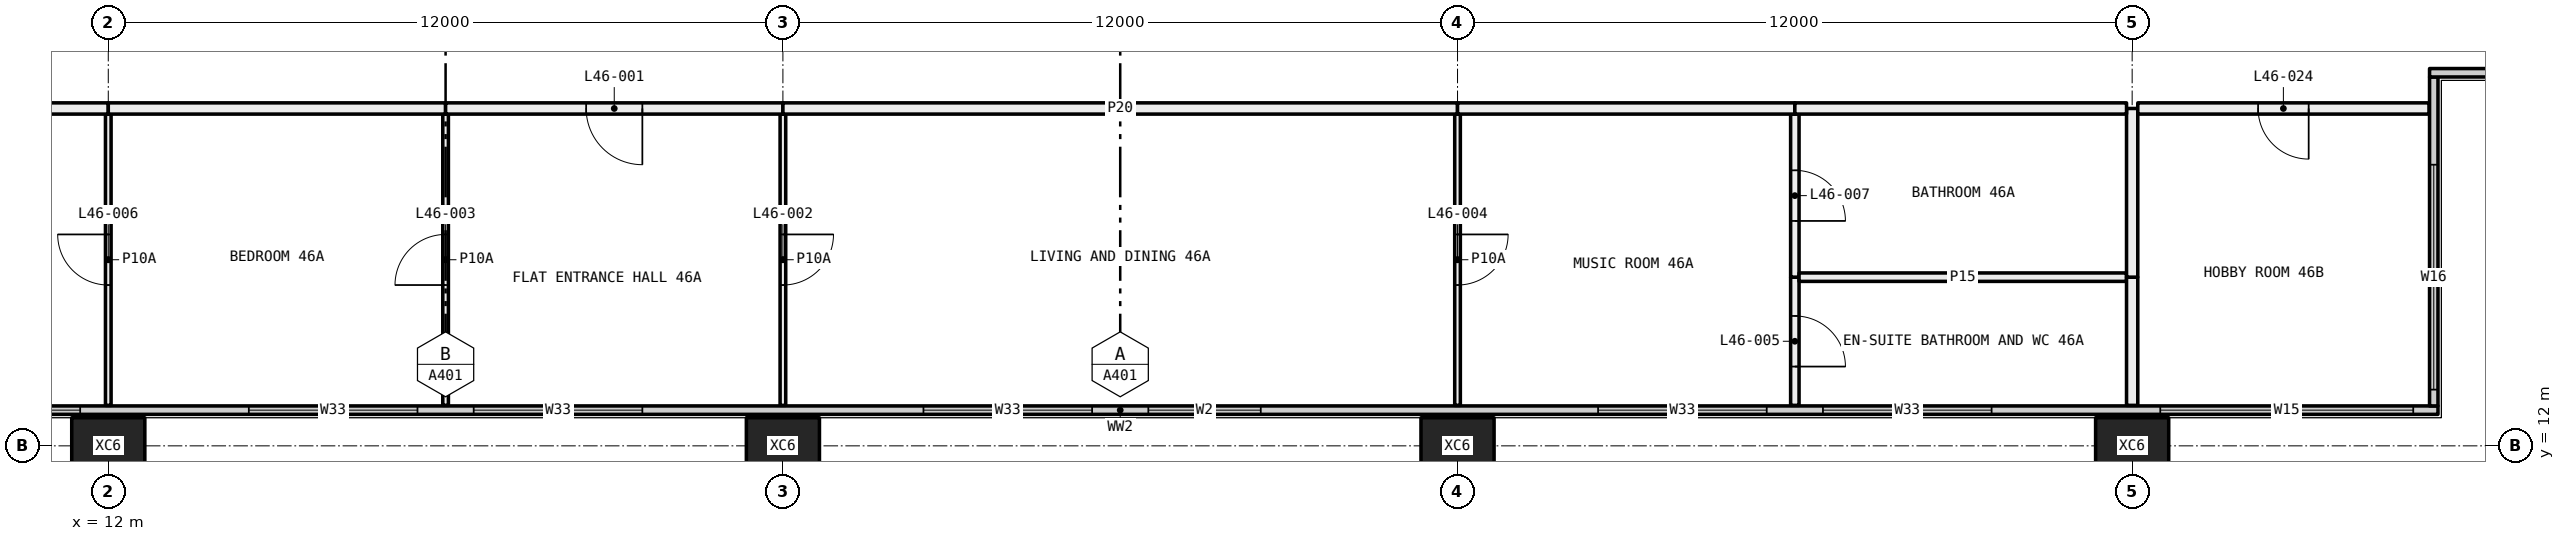
"""IFC4 building model, lengths in metres.
Left out: names, types, materials, properties, quantities, classifications, styles, units other than length and angle.
Written with IfcOpenShell. Run it as: python <this file> out.ifc"""

import sys

from ifc_helpers import new_model, si_unit, direction, frame, frame_2d, origin, origin_2d, place, context, subcontext, project, spatial, rectangle, hollow_rectangle, extrude, element, fill, save


model = new_model("IFC4")
c1 = context("Model", 3, precision=1e-05, world=origin(), true_north=direction((0.0, 1.0)))
c2 = subcontext(c1, "Body", "Model", "MODEL_VIEW")
j1 = project(units=[si_unit("LENGTHUNIT", "METRE"), si_unit("PLANEANGLEUNIT", "RADIAN")], contexts=[c1])
p1 = place(None, origin())
s1 = spatial("IfcSite", under=j1, at=p1, CompositionType="ELEMENT")
p2 = place(p1, origin())
s2 = spatial("IfcBuilding", under=s1, at=p2, CompositionType="ELEMENT")
p3 = place(p2, frame((0.0, 0.0, 175.5)))
s3 = spatial("IfcBuildingStorey", under=s2, at=p3, CompositionType="ELEMENT", Elevation=175.5)
for number, where, z_axis, x_axis in (
    (1, (12.0, 12.0, -0.4), (0.0, 0.0, 1.0), (1.0, 0.0, 0.0)),
    (2, (24.0, 12.0, -0.4), (0.0, 0.0, 1.0), (1.0, 0.0, 0.0)),
    (3, (36.0, 12.0, -0.4), (0.0, 0.0, 1.0), (1.0, 0.0, 0.0)),
    (4, (48.0, 12.0, -0.4), (0.0, 0.0, 1.0), (1.0, 0.0, 0.0)),
):
    element("IfcColumn", number, at=place(p3, frame(where, z_axis=z_axis, x_axis=x_axis)), inside=s3, PredefinedType="COLUMN", context=c2, shape_type="SweptSolid", body=[
        extrude(hollow_rectangle(XDim=1.3, YDim=1.0, WallThickness=0.05, at=origin_2d()), origin(), (0.0, 0.0, 1.0), 3.45),
    ])
p4 = place(p3, frame((6.56, 12.635, 0.0), z_axis=(0.0, 0.0, 1.0), x_axis=(1.0, 0.0, 0.0)))
e5 = element("IfcWall", 5, at=p4, inside=s3, PredefinedType="ELEMENTEDWALL", context=c2, shape_type="SweptSolid", body=[
    extrude(rectangle(XDim=46.88, YDim=0.15, at=frame_2d((23.44, 0.0))), origin(), (0.0, 0.0, 1.0), 3.05),
])
p5 = place(p4, frame((0.44, 0.0, 0.45)))
e6 = element("IfcOpeningElement", 6, at=p5, cuts=e5, PredefinedType="OPENING", context=c2, shape_type="SweptSolid", body=[
    extrude(rectangle(XDim=4.5, YDim=2.55, at=frame_2d((2.25, 1.275))), frame((0.0, 0.085, 0.0), z_axis=(0.0, -1.0, 0.0), x_axis=(1.0, 0.0, 0.0)), (0.0, 0.0, 1.0), 0.17),
])
p6 = place(p4, frame((7.94, 0.0, 0.45)))
e7 = element("IfcOpeningElement", 7, at=p6, cuts=e5, PredefinedType="OPENING", context=c2, shape_type="SweptSolid", body=[
    extrude(rectangle(XDim=3.0, YDim=2.55, at=frame_2d((1.5, 1.275))), frame((0.0, 0.085, 0.0), z_axis=(0.0, -1.0, 0.0), x_axis=(1.0, 0.0, 0.0)), (0.0, 0.0, 1.0), 0.17),
])
p7 = place(p4, frame((11.94, 0.0, 0.45)))
e8 = element("IfcOpeningElement", 8, at=p7, cuts=e5, PredefinedType="OPENING", context=c2, shape_type="SweptSolid", body=[
    extrude(rectangle(XDim=3.0, YDim=2.55, at=frame_2d((1.5, 1.275))), frame((0.0, 0.085, 0.0), z_axis=(0.0, -1.0, 0.0), x_axis=(1.0, 0.0, 0.0)), (0.0, 0.0, 1.0), 0.17),
])
p8 = place(p4, frame((19.94, 0.0, 0.45)))
e9 = element("IfcOpeningElement", 9, at=p8, cuts=e5, PredefinedType="OPENING", context=c2, shape_type="SweptSolid", body=[
    extrude(rectangle(XDim=3.0, YDim=2.55, at=frame_2d((1.5, 1.275))), frame((0.0, 0.085, 0.0), z_axis=(0.0, -1.0, 0.0), x_axis=(1.0, 0.0, 0.0)), (0.0, 0.0, 1.0), 0.17),
])
p9 = place(p4, frame((23.94, 0.0, 0.45)))
e10 = element("IfcOpeningElement", 10, at=p9, cuts=e5, PredefinedType="OPENING", context=c2, shape_type="SweptSolid", body=[
    extrude(rectangle(XDim=2.0, YDim=2.55, at=frame_2d((1.0, 1.275))), frame((0.0, 0.085, 0.0), z_axis=(0.0, -1.0, 0.0), x_axis=(1.0, 0.0, 0.0)), (0.0, 0.0, 1.0), 0.17),
])
p10 = place(p4, frame((31.94, 0.0, 0.45)))
e11 = element("IfcOpeningElement", 11, at=p10, cuts=e5, PredefinedType="OPENING", context=c2, shape_type="SweptSolid", body=[
    extrude(rectangle(XDim=3.0, YDim=2.55, at=frame_2d((1.5, 1.275))), frame((0.0, 0.085, 0.0), z_axis=(0.0, -1.0, 0.0), x_axis=(1.0, 0.0, 0.0)), (0.0, 0.0, 1.0), 0.17),
])
p11 = place(p4, frame((35.94, 0.0, 0.45)))
e12 = element("IfcOpeningElement", 12, at=p11, cuts=e5, PredefinedType="OPENING", context=c2, shape_type="SweptSolid", body=[
    extrude(rectangle(XDim=3.0, YDim=2.55, at=frame_2d((1.5, 1.275))), frame((0.0, 0.085, 0.0), z_axis=(0.0, -1.0, 0.0), x_axis=(1.0, 0.0, 0.0)), (0.0, 0.0, 1.0), 0.17),
])
p12 = place(p4, frame((41.94, 0.0, 0.45)))
e13 = element("IfcOpeningElement", 13, at=p12, cuts=e5, PredefinedType="OPENING", context=c2, shape_type="SweptSolid", body=[
    extrude(rectangle(XDim=4.5, YDim=2.55, at=frame_2d((2.25, 1.275))), frame((0.0, 0.085, 0.0), z_axis=(0.0, -1.0, 0.0), x_axis=(1.0, 0.0, 0.0)), (0.0, 0.0, 1.0), 0.17),
])
p13 = place(p3, frame((53.365, 12.71, 0.0), z_axis=(0.0, 0.0, 1.0), x_axis=(0.0, 1.0, 0.0)))
e14 = element("IfcWall", 14, at=p13, inside=s3, PredefinedType="ELEMENTEDWALL", context=c2, shape_type="SweptSolid", body=[
    extrude(rectangle(XDim=5.85, YDim=0.15, at=frame_2d((2.925, 0.0))), origin(), (0.0, 0.0, 1.0), 3.05),
])
p14 = place(p13, frame((0.29, 0.0, 0.45)))
e15 = element("IfcOpeningElement", 15, at=p14, cuts=e14, PredefinedType="OPENING", context=c2, shape_type="SweptSolid", body=[
    extrude(rectangle(XDim=4.0, YDim=2.55, at=frame_2d((2.0, 1.275))), frame((0.0, 0.085, 0.0), z_axis=(0.0, -1.0, 0.0), x_axis=(1.0, 0.0, 0.0)), (0.0, 0.0, 1.0), 0.17),
])
p15 = place(p3, frame((53.29, 18.635, 0.0), z_axis=(0.0, 0.0, 1.0), x_axis=(1.0, 0.0, 0.0)))
e16 = element("IfcWall", 16, at=p15, inside=s3, PredefinedType="ELEMENTEDWALL", context=c2, shape_type="SweptSolid", body=[
    extrude(rectangle(XDim=6.15, YDim=0.15, at=frame_2d((3.075, 0.0))), origin(), (0.0, 0.0, 1.0), 3.05),
])
p16 = place(p15, frame((1.71, 0.0, 0.45)))
e17 = element("IfcOpeningElement", 17, at=p16, cuts=e16, PredefinedType="OPENING", context=c2, shape_type="SweptSolid", body=[
    extrude(rectangle(XDim=4.0, YDim=2.55, at=frame_2d((2.0, 1.275))), frame((0.0, 0.085, 0.0), z_axis=(0.0, -1.0, 0.0), x_axis=(1.0, 0.0, 0.0)), (0.0, 0.0, 1.0), 0.17),
])
p17 = place(p3, frame((12.0, 12.72, 0.0), z_axis=(0.0, 0.0, 1.0), x_axis=(0.0, 1.0, 0.0)))
e18 = element("IfcWall", 18, at=p17, inside=s3, PredefinedType="PARTITIONING", context=c2, shape_type="SweptSolid", body=[
    extrude(rectangle(XDim=5.18, YDim=0.1, at=frame_2d((2.59, 0.0))), origin(), (0.0, 0.0, 1.0), 3.05),
])
p18 = place(p17, frame((2.14, 0.0, 0.0)))
e19 = element("IfcOpeningElement", 19, at=p18, cuts=e18, PredefinedType="OPENING", context=c2, shape_type="SweptSolid", body=[
    extrude(rectangle(XDim=0.9, YDim=2.1, at=frame_2d((0.45, 1.05))), frame((0.0, 0.06, 0.0), z_axis=(0.0, -1.0, 0.0), x_axis=(1.0, 0.0, 0.0)), (0.0, 0.0, 1.0), 0.12),
])
p19 = place(p3, frame((12.0, 18.0, 0.0), z_axis=(0.0, 0.0, 1.0), x_axis=(-1.0, 0.0, 0.0)))
e20 = element("IfcWall", 20, at=p19, inside=s3, PredefinedType="PARTITIONING", context=c2, shape_type="SweptSolid", body=[
    extrude(rectangle(XDim=1.9, YDim=0.2, at=frame_2d((0.95, 0.0))), origin(), (0.0, 0.0, 1.0), 3.05),
])
p20 = place(p3, frame((18.0, 12.72, 0.0), z_axis=(0.0, 0.0, 1.0), x_axis=(0.0, 1.0, 0.0)))
e21 = element("IfcWall", 21, at=p20, inside=s3, PredefinedType="PARTITIONING", context=c2, shape_type="SweptSolid", body=[
    extrude(rectangle(XDim=5.18, YDim=0.1, at=frame_2d((2.59, 0.0))), origin(), (0.0, 0.0, 1.0), 3.05),
])
p21 = place(p20, frame((2.14, 0.0, 0.0)))
e22 = element("IfcOpeningElement", 22, at=p21, cuts=e21, PredefinedType="OPENING", context=c2, shape_type="SweptSolid", body=[
    extrude(rectangle(XDim=0.9, YDim=2.1, at=frame_2d((0.45, 1.05))), frame((0.0, 0.06, 0.0), z_axis=(0.0, -1.0, 0.0), x_axis=(1.0, 0.0, 0.0)), (0.0, 0.0, 1.0), 0.12),
])
p22 = place(p3, frame((18.0, 18.0, 0.0), z_axis=(0.0, 0.0, 1.0), x_axis=(-1.0, 0.0, 0.0)))
e23 = element("IfcWall", 23, at=p22, inside=s3, PredefinedType="PARTITIONING", context=c2, shape_type="SweptSolid", body=[
    extrude(rectangle(XDim=6.0, YDim=0.2, at=frame_2d((3.0, 0.0))), origin(), (0.0, 0.0, 1.0), 3.05),
])
p23 = place(p3, frame((24.0, 12.72, 0.0), z_axis=(0.0, 0.0, 1.0), x_axis=(0.0, 1.0, 0.0)))
e24 = element("IfcWall", 24, at=p23, inside=s3, PredefinedType="PARTITIONING", context=c2, shape_type="SweptSolid", body=[
    extrude(rectangle(XDim=5.18, YDim=0.1, at=frame_2d((2.59, 0.0))), origin(), (0.0, 0.0, 1.0), 3.05),
])
p24 = place(p23, frame((2.14, 0.0, 0.0)))
e25 = element("IfcOpeningElement", 25, at=p24, cuts=e24, PredefinedType="OPENING", context=c2, shape_type="SweptSolid", body=[
    extrude(rectangle(XDim=0.9, YDim=2.1, at=frame_2d((0.45, 1.05))), frame((0.0, 0.06, 0.0), z_axis=(0.0, -1.0, 0.0), x_axis=(1.0, 0.0, 0.0)), (0.0, 0.0, 1.0), 0.12),
])
p25 = place(p3, frame((24.0, 18.0, 0.0), z_axis=(0.0, 0.0, 1.0), x_axis=(-1.0, 0.0, 0.0)))
e26 = element("IfcWall", 26, at=p25, inside=s3, PredefinedType="PARTITIONING", context=c2, shape_type="SweptSolid", body=[
    extrude(rectangle(XDim=6.0, YDim=0.2, at=frame_2d((3.0, 0.0))), origin(), (0.0, 0.0, 1.0), 3.05),
])
p26 = place(p25, frame((2.5, 0.0, 0.0)))
e27 = element("IfcOpeningElement", 27, at=p26, cuts=e26, PredefinedType="OPENING", context=c2, shape_type="SweptSolid", body=[
    extrude(rectangle(XDim=1.0, YDim=2.1, at=frame_2d((0.5, 1.05))), frame((0.0, 0.11, 0.0), z_axis=(0.0, -1.0, 0.0), x_axis=(1.0, 0.0, 0.0)), (0.0, 0.0, 1.0), 0.22),
])
p27 = place(p3, frame((36.0, 12.72, 0.0), z_axis=(0.0, 0.0, 1.0), x_axis=(0.0, 1.0, 0.0)))
e28 = element("IfcWall", 28, at=p27, inside=s3, PredefinedType="PARTITIONING", context=c2, shape_type="SweptSolid", body=[
    extrude(rectangle(XDim=5.18, YDim=0.1, at=frame_2d((2.59, 0.0))), origin(), (0.0, 0.0, 1.0), 2.45),
])
p28 = place(p27, frame((2.14, 0.0, 0.0)))
e29 = element("IfcOpeningElement", 29, at=p28, cuts=e28, PredefinedType="OPENING", context=c2, shape_type="SweptSolid", body=[
    extrude(rectangle(XDim=0.9, YDim=2.1, at=frame_2d((0.45, 1.05))), frame((0.0, 0.06, 0.0), z_axis=(0.0, -1.0, 0.0), x_axis=(1.0, 0.0, 0.0)), (0.0, 0.0, 1.0), 0.12),
])
p29 = place(p3, frame((36.0, 18.0, 0.0), z_axis=(0.0, 0.0, 1.0), x_axis=(-1.0, 0.0, 0.0)))
e30 = element("IfcWall", 30, at=p29, inside=s3, PredefinedType="PARTITIONING", context=c2, shape_type="SweptSolid", body=[
    extrude(rectangle(XDim=12.0, YDim=0.2, at=frame_2d((6.0, 0.0))), origin(), (0.0, 0.0, 1.0), 2.45),
])
p30 = place(p3, frame((42.0, 12.72, 0.0), z_axis=(0.0, 0.0, 1.0), x_axis=(0.0, 1.0, 0.0)))
e31 = element("IfcWall", 31, at=p30, inside=s3, PredefinedType="PARTITIONING", context=c2, shape_type="SweptSolid", body=[
    extrude(rectangle(XDim=2.28, YDim=0.15, at=frame_2d((1.14, 0.0))), origin(), (0.0, 0.0, 1.0), 3.05),
])
p31 = place(p30, frame((0.69, 0.0, 0.0)))
e32 = element("IfcOpeningElement", 32, at=p31, cuts=e31, PredefinedType="OPENING", context=c2, shape_type="SweptSolid", body=[
    extrude(rectangle(XDim=0.9, YDim=2.1, at=frame_2d((0.45, 1.05))), frame((0.0, 0.085, 0.0), z_axis=(0.0, -1.0, 0.0), x_axis=(1.0, 0.0, 0.0)), (0.0, 0.0, 1.0), 0.17),
])
p32 = place(p3, frame((42.0, 15.0, 0.0), z_axis=(0.0, 0.0, 1.0), x_axis=(0.0, 1.0, 0.0)))
e33 = element("IfcWall", 33, at=p32, inside=s3, PredefinedType="PARTITIONING", context=c2, shape_type="SweptSolid", body=[
    extrude(rectangle(XDim=2.9, YDim=0.15, at=frame_2d((1.45, 0.0))), origin(), (0.0, 0.0, 1.0), 3.05),
])
p33 = place(p32, frame((1.0, 0.0, 0.0)))
e34 = element("IfcOpeningElement", 34, at=p33, cuts=e33, PredefinedType="OPENING", context=c2, shape_type="SweptSolid", body=[
    extrude(rectangle(XDim=0.9, YDim=2.1, at=frame_2d((0.45, 1.05))), frame((0.0, 0.085, 0.0), z_axis=(0.0, -1.0, 0.0), x_axis=(1.0, 0.0, 0.0)), (0.0, 0.0, 1.0), 0.17),
])
p34 = place(p3, frame((42.0, 18.0, 0.0), z_axis=(0.0, 0.0, 1.0), x_axis=(-1.0, 0.0, 0.0)))
e35 = element("IfcWall", 35, at=p34, inside=s3, PredefinedType="PARTITIONING", context=c2, shape_type="SweptSolid", body=[
    extrude(rectangle(XDim=6.0, YDim=0.2, at=frame_2d((3.0, 0.0))), origin(), (0.0, 0.0, 1.0), 2.45),
])
p35 = place(p3, frame((47.9, 15.0, 0.0), z_axis=(0.0, 0.0, 1.0), x_axis=(-1.0, 0.0, 0.0)))
e36 = element("IfcWall", 36, at=p35, inside=s3, PredefinedType="PARTITIONING", context=c2, shape_type="SweptSolid", body=[
    extrude(rectangle(XDim=5.825, YDim=0.15, at=frame_2d((2.913, 0.0))), origin(), (0.0, 0.0, 1.0), 3.05),
])
p36 = place(p3, frame((48.0, 12.72, 0.0), z_axis=(0.0, 0.0, 1.0), x_axis=(0.0, 1.0, 0.0)))
e37 = element("IfcWall", 37, at=p36, inside=s3, PredefinedType="PARTITIONING", context=c2, shape_type="SweptSolid", body=[
    extrude(rectangle(XDim=2.28, YDim=0.2, at=frame_2d((1.14, 0.0))), origin(), (0.0, 0.0, 1.0), 3.05),
])
p37 = place(p3, frame((48.0, 15.0, 0.0), z_axis=(0.0, 0.0, 1.0), x_axis=(0.0, 1.0, 0.0)))
e38 = element("IfcWall", 38, at=p37, inside=s3, PredefinedType="PARTITIONING", context=c2, shape_type="SweptSolid", body=[
    extrude(rectangle(XDim=3.0, YDim=0.2, at=frame_2d((1.5, 0.0))), origin(), (0.0, 0.0, 1.0), 3.05),
])
p38 = place(p3, frame((47.9, 18.0, 0.0), z_axis=(0.0, 0.0, 1.0), x_axis=(-1.0, 0.0, 0.0)))
e39 = element("IfcWall", 39, at=p38, inside=s3, PredefinedType="PARTITIONING", context=c2, shape_type="SweptSolid", body=[
    extrude(rectangle(XDim=5.9, YDim=0.2, at=frame_2d((2.95, 0.0))), origin(), (0.0, 0.0, 1.0), 3.05),
])
p39 = place(p3, frame((53.28, 18.0, 0.0), z_axis=(0.0, 0.0, 1.0), x_axis=(-1.0, 0.0, 0.0)))
e40 = element("IfcWall", 40, at=p39, inside=s3, PredefinedType="PARTITIONING", context=c2, shape_type="SweptSolid", body=[
    extrude(rectangle(XDim=5.18, YDim=0.2, at=frame_2d((2.59, 0.0))), origin(), (0.0, 0.0, 1.0), 3.05),
])
p40 = place(p39, frame((2.14, 0.0, 0.0)))
e41 = element("IfcOpeningElement", 41, at=p40, cuts=e40, PredefinedType="OPENING", context=c2, shape_type="SweptSolid", body=[
    extrude(rectangle(XDim=0.9, YDim=2.1, at=frame_2d((0.45, 1.05))), frame((0.0, 0.11, 0.0), z_axis=(0.0, -1.0, 0.0), x_axis=(1.0, 0.0, 0.0)), (0.0, 0.0, 1.0), 0.22),
])
p41 = place(p5, origin())
e42 = element("IfcWindow", 42, at=p41, inside=s3, PartitioningType="SINGLE_PANEL", PredefinedType="WINDOW", context=c2, shape_type="SweptSolid", body=[
    extrude(rectangle(XDim=4.5, YDim=2.55, at=frame_2d((2.25, 1.275))), frame((0.0, 0.03, 0.0), z_axis=(0.0, -1.0, 0.0), x_axis=(1.0, 0.0, 0.0)), (0.0, 0.0, 1.0), 0.06),
])
fill(e6, e42)
p42 = place(p6, origin())
e43 = element("IfcWindow", 43, at=p42, inside=s3, PartitioningType="SINGLE_PANEL", PredefinedType="WINDOW", context=c2, shape_type="SweptSolid", body=[
    extrude(rectangle(XDim=3.0, YDim=2.55, at=frame_2d((1.5, 1.275))), frame((0.0, 0.03, 0.0), z_axis=(0.0, -1.0, 0.0), x_axis=(1.0, 0.0, 0.0)), (0.0, 0.0, 1.0), 0.06),
])
fill(e7, e43)
p43 = place(p7, origin())
e44 = element("IfcWindow", 44, at=p43, inside=s3, PartitioningType="SINGLE_PANEL", PredefinedType="WINDOW", context=c2, shape_type="SweptSolid", body=[
    extrude(rectangle(XDim=3.0, YDim=2.55, at=frame_2d((1.5, 1.275))), frame((0.0, 0.03, 0.0), z_axis=(0.0, -1.0, 0.0), x_axis=(1.0, 0.0, 0.0)), (0.0, 0.0, 1.0), 0.06),
])
fill(e8, e44)
p44 = place(p8, origin())
e45 = element("IfcWindow", 45, at=p44, inside=s3, PartitioningType="SINGLE_PANEL", PredefinedType="WINDOW", context=c2, shape_type="SweptSolid", body=[
    extrude(rectangle(XDim=3.0, YDim=2.55, at=frame_2d((1.5, 1.275))), frame((0.0, 0.03, 0.0), z_axis=(0.0, -1.0, 0.0), x_axis=(1.0, 0.0, 0.0)), (0.0, 0.0, 1.0), 0.06),
])
fill(e9, e45)
p45 = place(p9, origin())
e46 = element("IfcWindow", 46, at=p45, inside=s3, PartitioningType="SINGLE_PANEL", PredefinedType="WINDOW", context=c2, shape_type="SweptSolid", body=[
    extrude(rectangle(XDim=2.0, YDim=2.55, at=frame_2d((1.0, 1.275))), frame((0.0, 0.03, 0.0), z_axis=(0.0, -1.0, 0.0), x_axis=(1.0, 0.0, 0.0)), (0.0, 0.0, 1.0), 0.06),
])
fill(e10, e46)
p46 = place(p10, origin())
e47 = element("IfcWindow", 47, at=p46, inside=s3, PartitioningType="SINGLE_PANEL", PredefinedType="WINDOW", context=c2, shape_type="SweptSolid", body=[
    extrude(rectangle(XDim=3.0, YDim=2.55, at=frame_2d((1.5, 1.275))), frame((0.0, 0.03, 0.0), z_axis=(0.0, -1.0, 0.0), x_axis=(1.0, 0.0, 0.0)), (0.0, 0.0, 1.0), 0.06),
])
fill(e11, e47)
p47 = place(p11, origin())
e48 = element("IfcWindow", 48, at=p47, inside=s3, PartitioningType="SINGLE_PANEL", PredefinedType="WINDOW", context=c2, shape_type="SweptSolid", body=[
    extrude(rectangle(XDim=3.0, YDim=2.55, at=frame_2d((1.5, 1.275))), frame((0.0, 0.03, 0.0), z_axis=(0.0, -1.0, 0.0), x_axis=(1.0, 0.0, 0.0)), (0.0, 0.0, 1.0), 0.06),
])
fill(e12, e48)
p48 = place(p12, origin())
e49 = element("IfcWindow", 49, at=p48, inside=s3, PartitioningType="SINGLE_PANEL", PredefinedType="WINDOW", context=c2, shape_type="SweptSolid", body=[
    extrude(rectangle(XDim=4.5, YDim=2.55, at=frame_2d((2.25, 1.275))), frame((0.0, 0.03, 0.0), z_axis=(0.0, -1.0, 0.0), x_axis=(1.0, 0.0, 0.0)), (0.0, 0.0, 1.0), 0.06),
])
fill(e13, e49)
p49 = place(p14, origin())
e50 = element("IfcWindow", 50, at=p49, inside=s3, PartitioningType="SINGLE_PANEL", PredefinedType="WINDOW", context=c2, shape_type="SweptSolid", body=[
    extrude(rectangle(XDim=4.0, YDim=2.55, at=frame_2d((2.0, 1.275))), frame((0.0, 0.03, 0.0), z_axis=(0.0, -1.0, 0.0), x_axis=(1.0, 0.0, 0.0)), (0.0, 0.0, 1.0), 0.06),
])
fill(e15, e50)
p50 = place(p26, origin())
e51 = element("IfcDoor", 51, at=p50, inside=s3, OperationType="SINGLE_SWING_RIGHT", PredefinedType="DOOR", context=c2, shape_type="SweptSolid", body=[
    extrude(rectangle(XDim=1.0, YDim=2.1, at=frame_2d((0.5, 1.05))), frame((0.0, 0.025, 0.0), z_axis=(0.0, -1.0, 0.0), x_axis=(1.0, 0.0, 0.0)), (0.0, 0.0, 1.0), 0.05),
])
fill(e27, e51)
p51 = place(p24, frame((0.9, 0.0, 0.0), x_axis=(-1.0, 0.0, 0.0)))
e52 = element("IfcDoor", 52, at=p51, inside=s3, OperationType="SINGLE_SWING_RIGHT", PredefinedType="DOOR", context=c2, shape_type="SweptSolid", body=[
    extrude(rectangle(XDim=0.9, YDim=2.1, at=frame_2d((0.45, 1.05))), frame((0.0, 0.025, 0.0), z_axis=(0.0, -1.0, 0.0), x_axis=(1.0, 0.0, 0.0)), (0.0, 0.0, 1.0), 0.05),
])
fill(e25, e52)
p52 = place(p21, origin())
e53 = element("IfcDoor", 53, at=p52, inside=s3, OperationType="SINGLE_SWING_RIGHT", PredefinedType="DOOR", context=c2, shape_type="SweptSolid", body=[
    extrude(rectangle(XDim=0.9, YDim=2.1, at=frame_2d((0.45, 1.05))), frame((0.0, 0.025, 0.0), z_axis=(0.0, -1.0, 0.0), x_axis=(1.0, 0.0, 0.0)), (0.0, 0.0, 1.0), 0.05),
])
fill(e22, e53)
p53 = place(p28, frame((0.9, 0.0, 0.0), x_axis=(-1.0, 0.0, 0.0)))
e54 = element("IfcDoor", 54, at=p53, inside=s3, OperationType="SINGLE_SWING_RIGHT", PredefinedType="DOOR", context=c2, shape_type="SweptSolid", body=[
    extrude(rectangle(XDim=0.9, YDim=2.1, at=frame_2d((0.45, 1.05))), frame((0.0, 0.025, 0.0), z_axis=(0.0, -1.0, 0.0), x_axis=(1.0, 0.0, 0.0)), (0.0, 0.0, 1.0), 0.05),
])
fill(e29, e54)
p54 = place(p31, frame((0.9, 0.0, 0.0), x_axis=(-1.0, 0.0, 0.0)))
e55 = element("IfcDoor", 55, at=p54, inside=s3, OperationType="SINGLE_SWING_LEFT", PredefinedType="DOOR", context=c2, shape_type="SweptSolid", body=[
    extrude(rectangle(XDim=0.9, YDim=2.1, at=frame_2d((0.45, 1.05))), frame((0.0, 0.025, 0.0), z_axis=(0.0, -1.0, 0.0), x_axis=(1.0, 0.0, 0.0)), (0.0, 0.0, 1.0), 0.05),
])
fill(e32, e55)
p55 = place(p18, origin())
e56 = element("IfcDoor", 56, at=p55, inside=s3, OperationType="SINGLE_SWING_LEFT", PredefinedType="DOOR", context=c2, shape_type="SweptSolid", body=[
    extrude(rectangle(XDim=0.9, YDim=2.1, at=frame_2d((0.45, 1.05))), frame((0.0, 0.025, 0.0), z_axis=(0.0, -1.0, 0.0), x_axis=(1.0, 0.0, 0.0)), (0.0, 0.0, 1.0), 0.05),
])
fill(e19, e56)
p56 = place(p33, frame((0.9, 0.0, 0.0), x_axis=(-1.0, 0.0, 0.0)))
e57 = element("IfcDoor", 57, at=p56, inside=s3, OperationType="SINGLE_SWING_LEFT", PredefinedType="DOOR", context=c2, shape_type="SweptSolid", body=[
    extrude(rectangle(XDim=0.9, YDim=2.1, at=frame_2d((0.45, 1.05))), frame((0.0, 0.025, 0.0), z_axis=(0.0, -1.0, 0.0), x_axis=(1.0, 0.0, 0.0)), (0.0, 0.0, 1.0), 0.05),
])
fill(e34, e57)
p57 = place(p40, origin())
e58 = element("IfcDoor", 58, at=p57, inside=s3, OperationType="SINGLE_SWING_RIGHT", PredefinedType="DOOR", context=c2, shape_type="SweptSolid", body=[
    extrude(rectangle(XDim=0.9, YDim=2.1, at=frame_2d((0.45, 1.05))), frame((0.0, 0.025, 0.0), z_axis=(0.0, -1.0, 0.0), x_axis=(1.0, 0.0, 0.0)), (0.0, 0.0, 1.0), 0.05),
])
fill(e41, e58)
save(model, sys.argv[1])
